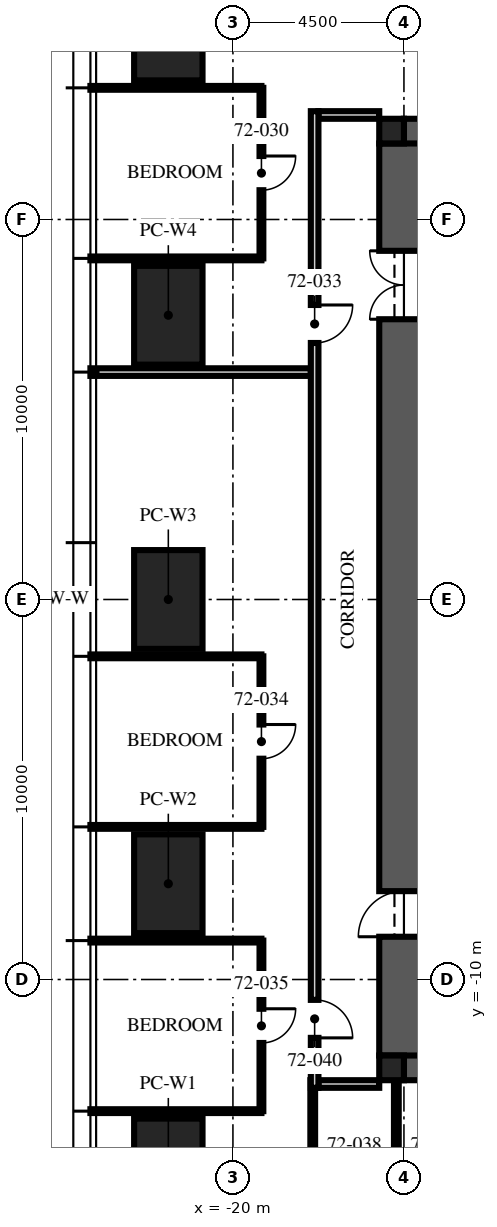
"""IFC4 building model, lengths in metres.
Left out: names, types, materials, properties, quantities, classifications, styles, units other than length and angle.
Written with IfcOpenShell. Run it as: python <this file> out.ifc"""

import sys

from ifc_helpers import new_model, si_unit, direction, frame, frame_2d, origin, origin_2d, place, context, subcontext, project, spatial, rectangle, extrude, element, fill, save


model = new_model("IFC4")
c1 = context("Model", 3, precision=1e-05, world=origin(), true_north=direction((0.0, 1.0)))
c2 = subcontext(c1, "Body", "Model", "MODEL_VIEW")
j1 = project(units=[si_unit("LENGTHUNIT", "METRE"), si_unit("PLANEANGLEUNIT", "RADIAN")], contexts=[c1])
p1 = place(None, origin())
s1 = spatial("IfcSite", under=j1, at=p1, CompositionType="ELEMENT")
p2 = place(p1, origin())
s2 = spatial("IfcBuilding", under=s1, at=p2, CompositionType="ELEMENT")
p3 = place(p2, frame((0.0, 0.0, 289.5)))
s3 = spatial("IfcBuildingStorey", under=s2, at=p3, CompositionType="ELEMENT", Elevation=289.5)
for number, where, z_axis, x_axis in (
    (1, (-15.5, 12.0, -0.25), (0.0, 0.0, 1.0), (1.0, 0.0, 0.0)),
    (2, (-15.5, -12.0, -0.25), (0.0, 0.0, 1.0), (1.0, 0.0, 0.0)),
):
    element("IfcWall", number, at=place(p3, frame(where, z_axis=z_axis, x_axis=x_axis)), inside=s3, PredefinedType="SHEAR", context=c2, shape_type="SweptSolid", body=[
        extrude(rectangle(XDim=31.0, YDim=1.3, at=frame_2d((15.5, 0.0))), origin(), (0.0, 0.0, 1.0), 3.75),
    ])
p4 = place(p3, frame((-15.5, -12.0, -0.25), z_axis=(0.0, 0.0, 1.0), x_axis=(0.0, 1.0, 0.0)))
e3 = element("IfcWall", 3, at=p4, inside=s3, PredefinedType="SHEAR", context=c2, shape_type="SweptSolid", body=[
    extrude(rectangle(XDim=24.0, YDim=1.3, at=frame_2d((12.0, 0.0))), origin(), (0.0, 0.0, 1.0), 3.75),
])
p5 = place(p4, frame((3.125, 0.0, 0.25)))
e4 = element("IfcOpeningElement", 4, at=p5, cuts=e3, PredefinedType="OPENING", context=c2, shape_type="SweptSolid", body=[
    extrude(rectangle(XDim=1.2, YDim=2.1, at=frame_2d((0.6, 1.05))), frame((0.0, 0.66, 0.0), z_axis=(0.0, -1.0, 0.0), x_axis=(1.0, 0.0, 0.0)), (0.0, 0.0, 1.0), 1.32),
])
p6 = place(p4, frame((19.375, 0.0, 0.25)))
e5 = element("IfcOpeningElement", 5, at=p6, cuts=e3, PredefinedType="OPENING", context=c2, shape_type="SweptSolid", body=[
    extrude(rectangle(XDim=1.8, YDim=2.1, at=frame_2d((0.9, 1.05))), frame((0.0, 0.66, 0.0), z_axis=(0.0, -1.0, 0.0), x_axis=(1.0, 0.0, 0.0)), (0.0, 0.0, 1.0), 1.32),
])
for number, where, z_axis, x_axis in (
    (6, (-15.825, 12.325, -0.25), (0.0, 0.0, 1.0), (1.0, 0.0, 0.0)),
    (7, (-15.825, -12.325, -0.25), (0.0, 0.0, 1.0), (1.0, 0.0, 0.0)),
):
    element("IfcColumn", number, at=place(p3, frame(where, z_axis=z_axis, x_axis=x_axis)), inside=s3, PredefinedType="COLUMN", context=c2, shape_type="SweptSolid", body=[
        extrude(rectangle(XDim=0.65, YDim=0.65, at=origin_2d()), origin(), (0.0, 0.0, 1.0), 3.75),
    ])
for number, where, z_axis, x_axis in (
    (8, (-21.7, -14.96, 0.0), (0.0, 0.0, 1.0), (0.0, 1.0, 0.0)),
    (9, (-21.7, -7.48, 0.0), (0.0, 0.0, 1.0), (0.0, 1.0, 0.0)),
    (10, (-21.7, 0.0, 0.0), (0.0, 0.0, 1.0), (0.0, 1.0, 0.0)),
    (11, (-21.7, 7.48, 0.0), (0.0, 0.0, 1.0), (0.0, 1.0, 0.0)),
    (12, (-21.7, 14.96, 0.0), (0.0, 0.0, 1.0), (0.0, 1.0, 0.0)),
):
    element("IfcColumn", number, at=place(p3, frame(where, z_axis=z_axis, x_axis=x_axis)), inside=s3, PredefinedType="COLUMN", context=c2, shape_type="SweptSolid", body=[
        extrude(rectangle(XDim=2.6, YDim=1.8, at=origin_2d()), origin(), (0.0, 0.0, 1.0), 3.75),
    ])
for number, where, z_axis, x_axis in (
    (13, (-16.15, 12.75, 0.0), (0.0, 0.0, 1.0), (-1.0, 0.0, 0.0)),
    (14, (-16.15, -12.75, 0.0), (0.0, 0.0, 1.0), (-1.0, 0.0, 0.0)),
):
    element("IfcWall", number, at=place(p3, frame(where, z_axis=z_axis, x_axis=x_axis)), inside=s3, PredefinedType="PARTITIONING", context=c2, shape_type="SweptSolid", body=[
        extrude(rectangle(XDim=1.6, YDim=0.2, at=frame_2d((0.8, 0.0))), origin(), (0.0, 0.0, 1.0), 2.6),
    ])
for number, where, z_axis, x_axis in (
    (15, (-19.25, 13.464, 0.0), (0.0, 0.0, 1.0), (-1.0, 0.0, 0.0)),
    (16, (-19.25, 8.976, 0.0), (0.0, 0.0, 1.0), (-1.0, 0.0, 0.0)),
):
    element("IfcWall", number, at=place(p3, frame(where, z_axis=z_axis, x_axis=x_axis)), inside=s3, PredefinedType="PARTITIONING", context=c2, shape_type="SweptSolid", body=[
        extrude(rectangle(XDim=4.5, YDim=0.1, at=frame_2d((2.25, 0.0))), origin(), (0.0, 0.0, 1.0), 3.01),
    ])
p7 = place(p3, frame((-17.95, 5.984, 0.0), z_axis=(0.0, 0.0, 1.0), x_axis=(-1.0, 0.0, 0.0)))
e17 = element("IfcWall", 17, at=p7, inside=s3, PredefinedType="PARTITIONING", context=c2, shape_type="SweptSolid", body=[
    extrude(rectangle(XDim=5.8, YDim=0.2, at=frame_2d((2.9, 0.0))), origin(), (0.0, 0.0, 1.0), 3.01),
])
for number, where, z_axis, x_axis in (
    (18, (-19.25, -1.496, 0.0), (0.0, 0.0, 1.0), (-1.0, 0.0, 0.0)),
    (19, (-19.25, -5.984, 0.0), (0.0, 0.0, 1.0), (-1.0, 0.0, 0.0)),
    (20, (-19.25, -8.976, 0.0), (0.0, 0.0, 1.0), (-1.0, 0.0, 0.0)),
    (21, (-19.25, -13.464, 0.0), (0.0, 0.0, 1.0), (-1.0, 0.0, 0.0)),
):
    element("IfcWall", number, at=place(p3, frame(where, z_axis=z_axis, x_axis=x_axis)), inside=s3, PredefinedType="PARTITIONING", context=c2, shape_type="SweptSolid", body=[
        extrude(rectangle(XDim=4.5, YDim=0.1, at=frame_2d((2.25, 0.0))), origin(), (0.0, 0.0, 1.0), 3.01),
    ])
p8 = place(p3, frame((-19.25, 13.464, 0.0), z_axis=(0.0, 0.0, 1.0), x_axis=(0.0, -1.0, 0.0)))
e22 = element("IfcWall", 22, at=p8, inside=s3, PredefinedType="PARTITIONING", context=c2, shape_type="SweptSolid", body=[
    extrude(rectangle(XDim=4.488, YDim=0.1, at=frame_2d((2.244, 0.0))), origin(), (0.0, 0.0, 1.0), 2.91),
])
p9 = place(p8, frame((1.794, 0.0, 0.0)))
e23 = element("IfcOpeningElement", 23, at=p9, cuts=e22, PredefinedType="OPENING", context=c2, shape_type="SweptSolid", body=[
    extrude(rectangle(XDim=0.9, YDim=2.1, at=frame_2d((0.45, 1.05))), frame((0.0, 0.06, 0.0), z_axis=(0.0, -1.0, 0.0), x_axis=(1.0, 0.0, 0.0)), (0.0, 0.0, 1.0), 0.12),
])
p10 = place(p3, frame((-19.25, -1.496, 0.0), z_axis=(0.0, 0.0, 1.0), x_axis=(0.0, -1.0, 0.0)))
e24 = element("IfcWall", 24, at=p10, inside=s3, PredefinedType="PARTITIONING", context=c2, shape_type="SweptSolid", body=[
    extrude(rectangle(XDim=4.488, YDim=0.1, at=frame_2d((2.244, 0.0))), origin(), (0.0, 0.0, 1.0), 2.91),
])
p11 = place(p10, frame((1.794, 0.0, 0.0)))
e25 = element("IfcOpeningElement", 25, at=p11, cuts=e24, PredefinedType="OPENING", context=c2, shape_type="SweptSolid", body=[
    extrude(rectangle(XDim=0.9, YDim=2.1, at=frame_2d((0.45, 1.05))), frame((0.0, 0.06, 0.0), z_axis=(0.0, -1.0, 0.0), x_axis=(1.0, 0.0, 0.0)), (0.0, 0.0, 1.0), 0.12),
])
p12 = place(p3, frame((-19.25, -8.976, 0.0), z_axis=(0.0, 0.0, 1.0), x_axis=(0.0, -1.0, 0.0)))
e26 = element("IfcWall", 26, at=p12, inside=s3, PredefinedType="PARTITIONING", context=c2, shape_type="SweptSolid", body=[
    extrude(rectangle(XDim=4.488, YDim=0.1, at=frame_2d((2.244, 0.0))), origin(), (0.0, 0.0, 1.0), 2.91),
])
p13 = place(p12, frame((1.794, 0.0, 0.0)))
e27 = element("IfcOpeningElement", 27, at=p13, cuts=e26, PredefinedType="OPENING", context=c2, shape_type="SweptSolid", body=[
    extrude(rectangle(XDim=0.9, YDim=2.1, at=frame_2d((0.45, 1.05))), frame((0.0, 0.06, 0.0), z_axis=(0.0, -1.0, 0.0), x_axis=(1.0, 0.0, 0.0)), (0.0, 0.0, 1.0), 0.12),
])
p14 = place(p3, frame((-17.9, -12.65, 0.0), z_axis=(0.0, 0.0, 1.0), x_axis=(0.0, -1.0, 0.0)))
e28 = element("IfcWall", 28, at=p14, inside=s3, PredefinedType="PARTITIONING", context=c2, shape_type="SweptSolid", body=[
    extrude(rectangle(XDim=2.8, YDim=0.125, at=frame_2d((1.4, 0.0))), origin(), (0.0, 0.0, 1.0), 2.9),
])
p15 = place(p3, frame((-15.7, -12.65, 0.0), z_axis=(0.0, 0.0, 1.0), x_axis=(0.0, -1.0, 0.0)))
e29 = element("IfcWall", 29, at=p15, inside=s3, PredefinedType="PARTITIONING", context=c2, shape_type="SweptSolid", body=[
    extrude(rectangle(XDim=2.8, YDim=0.125, at=frame_2d((1.4, 0.0))), origin(), (0.0, 0.0, 1.0), 2.6),
])
p16 = place(p3, frame((-17.85, 12.85, 0.0), z_axis=(0.0, 0.0, 1.0), x_axis=(0.0, -1.0, 0.0)))
e30 = element("IfcWall", 30, at=p16, inside=s3, PredefinedType="PARTITIONING", context=c2, shape_type="SweptSolid", body=[
    extrude(rectangle(XDim=25.7, YDim=0.2, at=frame_2d((12.85, 0.0))), origin(), (0.0, 0.0, 1.0), 2.9),
])
p17 = place(p16, frame((5.1, 0.0, 0.0)))
e31 = element("IfcOpeningElement", 31, at=p17, cuts=e30, PredefinedType="OPENING", context=c2, shape_type="SweptSolid", body=[
    extrude(rectangle(XDim=1.0, YDim=2.2, at=frame_2d((0.5, 1.1))), frame((0.0, 0.11, 0.0), z_axis=(0.0, -1.0, 0.0), x_axis=(1.0, 0.0, 0.0)), (0.0, 0.0, 1.0), 0.22),
])
p18 = place(p16, frame((23.386, 0.0, 0.0)))
e32 = element("IfcOpeningElement", 32, at=p18, cuts=e30, PredefinedType="OPENING", context=c2, shape_type="SweptSolid", body=[
    extrude(rectangle(XDim=1.0, YDim=2.2, at=frame_2d((0.5, 1.1))), frame((0.0, 0.11, 0.0), z_axis=(0.0, -1.0, 0.0), x_axis=(1.0, 0.0, 0.0)), (0.0, 0.0, 1.0), 0.22),
])
p19 = place(p5, origin())
e33 = element("IfcDoor", 33, at=p19, inside=s3, OperationType="SINGLE_SWING_LEFT", PredefinedType="DOOR", context=c2, shape_type="SweptSolid", body=[
    extrude(rectangle(XDim=1.2, YDim=2.1, at=frame_2d((0.6, 1.05))), frame((0.0, 0.025, 0.0), z_axis=(0.0, -1.0, 0.0), x_axis=(1.0, 0.0, 0.0)), (0.0, 0.0, 1.0), 0.05),
])
fill(e4, e33)
p20 = place(p6, origin())
e34 = element("IfcDoor", 34, at=p20, inside=s3, OperationType="DOUBLE_DOOR_SINGLE_SWING", PredefinedType="DOOR", context=c2, shape_type="SweptSolid", body=[
    extrude(rectangle(XDim=1.8, YDim=2.1, at=frame_2d((0.9, 1.05))), frame((0.0, 0.025, 0.0), z_axis=(0.0, -1.0, 0.0), x_axis=(1.0, 0.0, 0.0)), (0.0, 0.0, 1.0), 0.05),
])
fill(e5, e34)
p21 = place(p9, origin())
e35 = element("IfcDoor", 35, at=p21, inside=s3, OperationType="SINGLE_SWING_LEFT", PredefinedType="DOOR", context=c2, shape_type="SweptSolid", body=[
    extrude(rectangle(XDim=0.9, YDim=2.1, at=frame_2d((0.45, 1.05))), frame((0.0, 0.025, 0.0), z_axis=(0.0, -1.0, 0.0), x_axis=(1.0, 0.0, 0.0)), (0.0, 0.0, 1.0), 0.05),
])
fill(e23, e35)
p22 = place(p17, origin())
e36 = element("IfcDoor", 36, at=p22, inside=s3, OperationType="SINGLE_SWING_LEFT", PredefinedType="DOOR", context=c2, shape_type="SweptSolid", body=[
    extrude(rectangle(XDim=1.0, YDim=2.2, at=frame_2d((0.5, 1.1))), frame((0.0, 0.025, 0.0), z_axis=(0.0, -1.0, 0.0), x_axis=(1.0, 0.0, 0.0)), (0.0, 0.0, 1.0), 0.05),
])
fill(e31, e36)
p23 = place(p11, origin())
e37 = element("IfcDoor", 37, at=p23, inside=s3, OperationType="SINGLE_SWING_LEFT", PredefinedType="DOOR", context=c2, shape_type="SweptSolid", body=[
    extrude(rectangle(XDim=0.9, YDim=2.1, at=frame_2d((0.45, 1.05))), frame((0.0, 0.025, 0.0), z_axis=(0.0, -1.0, 0.0), x_axis=(1.0, 0.0, 0.0)), (0.0, 0.0, 1.0), 0.05),
])
fill(e25, e37)
p24 = place(p13, origin())
e38 = element("IfcDoor", 38, at=p24, inside=s3, OperationType="SINGLE_SWING_LEFT", PredefinedType="DOOR", context=c2, shape_type="SweptSolid", body=[
    extrude(rectangle(XDim=0.9, YDim=2.1, at=frame_2d((0.45, 1.05))), frame((0.0, 0.025, 0.0), z_axis=(0.0, -1.0, 0.0), x_axis=(1.0, 0.0, 0.0)), (0.0, 0.0, 1.0), 0.05),
])
fill(e27, e38)
p25 = place(p18, origin())
e39 = element("IfcDoor", 39, at=p25, inside=s3, OperationType="SINGLE_SWING_RIGHT", PredefinedType="DOOR", context=c2, shape_type="SweptSolid", body=[
    extrude(rectangle(XDim=1.0, YDim=2.2, at=frame_2d((0.5, 1.1))), frame((0.0, 0.025, 0.0), z_axis=(0.0, -1.0, 0.0), x_axis=(1.0, 0.0, 0.0)), (0.0, 0.0, 1.0), 0.05),
])
fill(e32, e39)
save(model, sys.argv[1])
